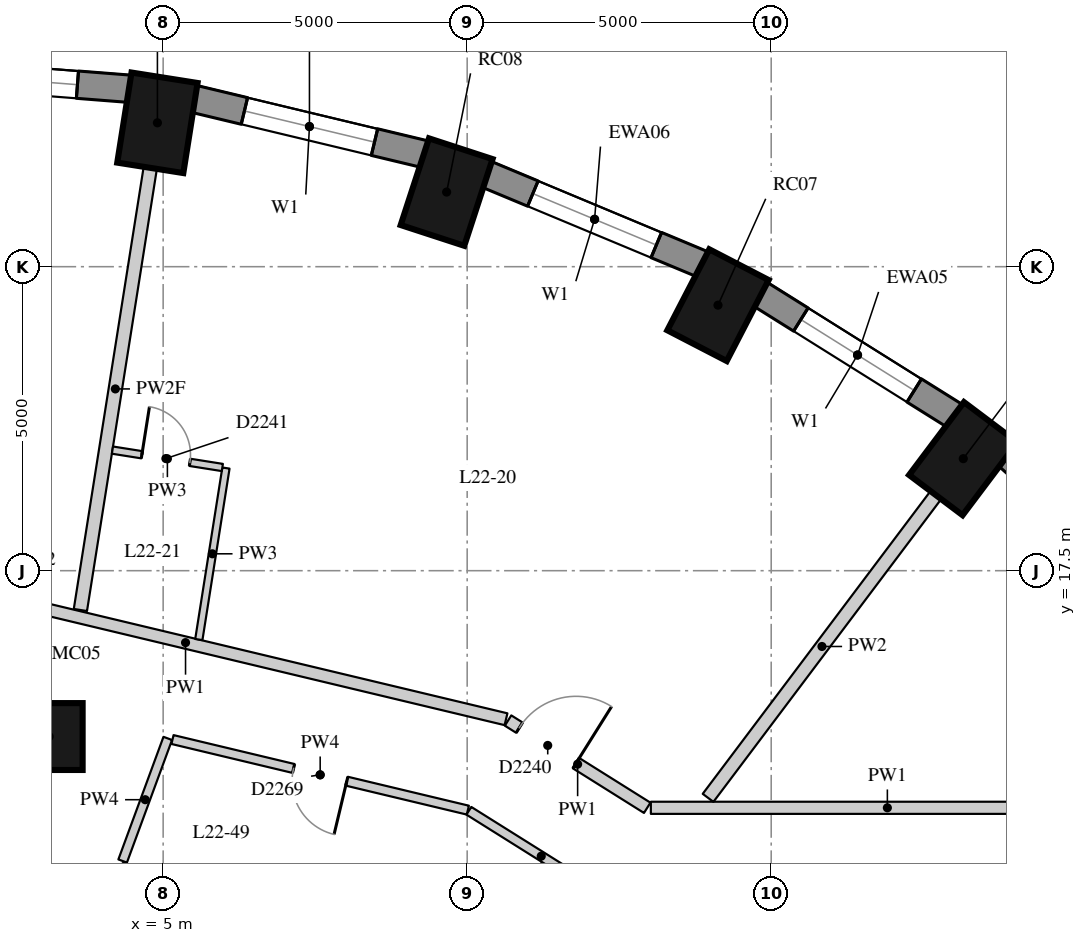
"""IFC4 building model, lengths in metres.
Left out: names, types, materials, properties, quantities, classifications, styles, units other than length and angle.
Written with IfcOpenShell. Run it as: python <this file> out.ifc"""

import sys

from ifc_helpers import new_model, si_unit, direction, frame, frame_2d, origin, origin_2d, place, context, subcontext, project, spatial, rectangle, extrude, element, fill, save


model = new_model("IFC4")
c1 = context("Model", 3, precision=1e-05, world=origin(), true_north=direction((0.0, 1.0)))
c2 = subcontext(c1, "Body", "Model", "MODEL_VIEW")
j1 = project(units=[si_unit("LENGTHUNIT", "METRE"), si_unit("PLANEANGLEUNIT", "RADIAN")], contexts=[c1])
p1 = place(None, origin())
s1 = spatial("IfcSite", under=j1, at=p1, CompositionType="ELEMENT")
p2 = place(p1, origin())
s2 = spatial("IfcBuilding", under=s1, at=p2, CompositionType="ELEMENT")
p3 = place(p2, frame((0.0, 0.0, 81.1)))
s3 = spatial("IfcBuildingStorey", under=s2, at=p3, CompositionType="ELEMENT", Elevation=81.1)
for number, where, z_axis, x_axis in (
    (1, (18.159, 19.343, 0.0), (0.0, 0.0, 1.0), (0.601, 0.799, 0.0)),
    (2, (14.125, 21.867, 0.0), (0.0, 0.0, 1.0), (0.46, 0.888, 0.0)),
    (3, (9.662, 23.727, 0.0), (0.0, 0.0, 1.0), (0.31, 0.951, 0.0)),
    (4, (4.906, 24.866, 0.0), (0.0, 0.0, 1.0), (0.156, 0.988, 0.0)),
):
    element("IfcColumn", number, at=place(p3, frame(where, z_axis=z_axis, x_axis=x_axis)), inside=s3, PredefinedType="COLUMN", context=c2, shape_type="SweptSolid", body=[
        extrude(rectangle(XDim=1.5, YDim=1.1, at=origin_2d()), origin(), (0.0, 0.0, 1.0), 3.3),
    ])
p4 = place(p3, frame((3.126, 14.772, 0.0), z_axis=(0.0, 0.0, 1.0), x_axis=(1.0, 0.0, 0.0)))
e5 = element("IfcColumn", 5, at=p4, inside=s3, PredefinedType="COLUMN", context=c2, shape_type="SweptSolid", body=[
    extrude(rectangle(XDim=1.1, YDim=1.1, at=origin_2d()), origin(), (0.0, 0.0, 1.0), 3.3),
])
p5 = place(p3, frame((21.627, 16.943, 0.0), z_axis=(0.0, 0.0, 1.0), x_axis=(-0.745526233716, 0.66647628228, 0.0)))
e6 = element("IfcWall", 6, at=p5, inside=s3, PredefinedType="SOLIDWALL", context=c2, shape_type="SweptSolid", body=[
    extrude(rectangle(XDim=3.697, YDim=0.45, at=frame_2d((1.848, 0.0))), origin(), (0.0, 0.0, 1.0), 2.85),
])
p6 = place(p3, frame((18.023, 20.044, 0.0), z_axis=(0.0, 0.0, 1.0), x_axis=(-0.847635480093, 0.530579016629, 0.0)))
e7 = element("IfcWall", 7, at=p6, inside=s3, PredefinedType="SOLIDWALL", context=c2, shape_type="SweptSolid", body=[
    extrude(rectangle(XDim=3.782, YDim=0.45, at=frame_2d((1.891, 0.0))), origin(), (0.0, 0.0, 1.0), 2.85),
])
p7 = place(p6, frame((0.791, 0.0, 0.4)))
e8 = element("IfcOpeningElement", 8, at=p7, cuts=e7, PredefinedType="OPENING", context=c2, shape_type="SweptSolid", body=[
    extrude(rectangle(XDim=2.2, YDim=1.75, at=frame_2d((1.1, 0.875))), frame((0.0, 0.235, 0.0), z_axis=(0.0, -1.0, 0.0), x_axis=(1.0, 0.0, 0.0)), (0.0, 0.0, 1.0), 0.47),
])
p8 = place(p3, frame((13.875, 22.537, 0.0), z_axis=(0.0, 0.0, 1.0), x_axis=(-0.923031964282, 0.384723267966, 0.0)))
e9 = element("IfcWall", 9, at=p8, inside=s3, PredefinedType="SOLIDWALL", context=c2, shape_type="SweptSolid", body=[
    extrude(rectangle(XDim=3.856, YDim=0.45, at=frame_2d((1.928, 0.0))), origin(), (0.0, 0.0, 1.0), 2.85),
])
p9 = place(p8, frame((0.828, 0.0, 0.4)))
e10 = element("IfcOpeningElement", 10, at=p9, cuts=e9, PredefinedType="OPENING", context=c2, shape_type="SweptSolid", body=[
    extrude(rectangle(XDim=2.2, YDim=1.75, at=frame_2d((1.1, 0.875))), frame((0.0, 0.235, 0.0), z_axis=(0.0, -1.0, 0.0), x_axis=(1.0, 0.0, 0.0)), (0.0, 0.0, 1.0), 0.47),
])
p10 = place(p3, frame((9.308, 24.35, 0.0), z_axis=(0.0, 0.0, 1.0), x_axis=(-0.972496561493, 0.232917233979, 0.0)))
e11 = element("IfcWall", 11, at=p10, inside=s3, PredefinedType="SOLIDWALL", context=c2, shape_type="SweptSolid", body=[
    extrude(rectangle(XDim=3.911, YDim=0.45, at=frame_2d((1.956, 0.0))), origin(), (0.0, 0.0, 1.0), 2.85),
])
p11 = place(p10, frame((0.855, 0.0, 0.4)))
e12 = element("IfcOpeningElement", 12, at=p11, cuts=e11, PredefinedType="OPENING", context=c2, shape_type="SweptSolid", body=[
    extrude(rectangle(XDim=2.2, YDim=1.75, at=frame_2d((1.1, 0.875))), frame((0.0, 0.235, 0.0), z_axis=(0.0, -1.0, 0.0), x_axis=(1.0, 0.0, 0.0)), (0.0, 0.0, 1.0), 0.47),
])
p12 = place(p3, frame((4.457, 25.426, 0.0), z_axis=(0.0, 0.0, 1.0), x_axis=(-0.996955972145, 0.077966592873, 0.0)))
e13 = element("IfcWall", 13, at=p12, inside=s3, PredefinedType="SOLIDWALL", context=c2, shape_type="SweptSolid", body=[
    extrude(rectangle(XDim=3.939, YDim=0.45, at=frame_2d((1.97, 0.0))), origin(), (0.0, 0.0, 1.0), 2.85),
])
p13 = place(p12, frame((0.87, 0.0, 0.4)))
e14 = element("IfcOpeningElement", 14, at=p13, cuts=e13, PredefinedType="OPENING", context=c2, shape_type="SweptSolid", body=[
    extrude(rectangle(XDim=2.2, YDim=1.75, at=frame_2d((1.1, 0.875))), frame((0.0, 0.235, 0.0), z_axis=(0.0, -1.0, 0.0), x_axis=(1.0, 0.0, 0.0)), (0.0, 0.0, 1.0), 0.47),
])
p14 = place(p3, frame((0.098, 17.577, 0.0), z_axis=(0.0, 0.0, 1.0), x_axis=(0.97259262522, -0.232515774447, 0.0)))
e15 = element("IfcWall", 15, at=p14, inside=s3, PredefinedType="PARTITIONING", context=c2, shape_type="SweptSolid", body=[
    extrude(rectangle(XDim=10.838, YDim=0.2, at=frame_2d((5.419, 0.0))), origin(), (0.0, 0.0, 1.0), 2.85),
])
p15 = place(p14, frame((1.905, 0.0, 0.0)))
e16 = element("IfcOpeningElement", 16, at=p15, cuts=e15, PredefinedType="OPENING", context=c2, shape_type="SweptSolid", body=[
    extrude(rectangle(XDim=1.0, YDim=2.1, at=frame_2d((0.5, 1.05))), frame((0.0, 0.11, 0.0), z_axis=(0.0, -1.0, 0.0), x_axis=(1.0, 0.0, 0.0)), (0.0, 0.0, 1.0), 0.22),
])
p16 = place(p3, frame((10.672, 15.035, 0.0), z_axis=(0.0, 0.0, 1.0), x_axis=(0.847149253931, -0.531355005213, 0.0)))
e17 = element("IfcWall", 17, at=p16, inside=s3, PredefinedType="PARTITIONING", context=c2, shape_type="SweptSolid", body=[
    extrude(rectangle(XDim=2.701, YDim=0.2, at=frame_2d((1.351, 0.0))), origin(), (0.0, 0.0, 1.0), 2.85),
])
p17 = place(p16, frame((0.22, 0.0, 0.0)))
e18 = element("IfcOpeningElement", 18, at=p17, cuts=e17, PredefinedType="OPENING", context=c2, shape_type="SweptSolid", body=[
    extrude(rectangle(XDim=1.1, YDim=2.1, at=frame_2d((0.55, 1.05))), frame((0.0, 0.11, 0.0), z_axis=(0.0, -1.0, 0.0), x_axis=(1.0, 0.0, 0.0)), (0.0, 0.0, 1.0), 0.22),
])
p18 = place(p3, frame((13.021, 13.6, 0.0), z_axis=(0.0, 0.0, 1.0), x_axis=(1.0, 0.0, 0.0)))
e19 = element("IfcWall", 19, at=p18, inside=s3, PredefinedType="PARTITIONING", context=c2, shape_type="SweptSolid", body=[
    extrude(rectangle(XDim=7.779, YDim=0.2, at=frame_2d((3.89, 0.0))), origin(), (0.0, 0.0, 1.0), 2.85),
])
p19 = place(p3, frame((4.865, 12.042, 0.0), z_axis=(0.0, 0.0, 1.0), x_axis=(-0.660014599896, 0.751252772323, 0.0)))
e20 = element("IfcWall", 20, at=p19, inside=s3, PredefinedType="PARTITIONING", context=c2, shape_type="SweptSolid", body=[
    extrude(rectangle(XDim=0.835, YDim=0.15, at=frame_2d((0.417, 0.0))), origin(), (0.0, 0.0, 1.0), 2.4),
])
p20 = place(p3, frame((4.334, 12.725, 0.0), z_axis=(0.0, 0.0, 1.0), x_axis=(0.345226102509, 0.938519545959, 0.0)))
e21 = element("IfcWall", 21, at=p20, inside=s3, PredefinedType="PARTITIONING", context=c2, shape_type="SweptSolid", body=[
    extrude(rectangle(XDim=2.148, YDim=0.15, at=frame_2d((1.074, 0.0))), origin(), (0.0, 0.0, 1.0), 2.85),
])
p21 = place(p3, frame((5.154, 14.723, 0.0), z_axis=(0.0, 0.0, 1.0), x_axis=(0.972595476038, -0.232503849411, 0.0)))
e22 = element("IfcWall", 22, at=p21, inside=s3, PredefinedType="PARTITIONING", context=c2, shape_type="SweptSolid", body=[
    extrude(rectangle(XDim=4.994, YDim=0.15, at=frame_2d((2.497, 0.0))), origin(), (0.0, 0.0, 1.0), 2.85),
])
p22 = place(p21, frame((2.047, 0.0, 0.0)))
e23 = element("IfcOpeningElement", 23, at=p22, cuts=e22, PredefinedType="OPENING", context=c2, shape_type="SweptSolid", body=[
    extrude(rectangle(XDim=0.9, YDim=2.1, at=frame_2d((0.45, 1.05))), frame((0.0, 0.085, 0.0), z_axis=(0.0, -1.0, 0.0), x_axis=(1.0, 0.0, 0.0)), (0.0, 0.0, 1.0), 0.17),
])
p23 = place(p3, frame((10.028, 13.551, 0.0), z_axis=(0.0, 0.0, 1.0), x_axis=(0.847128314977, -0.531388387118, 0.0)))
e24 = element("IfcWall", 24, at=p23, inside=s3, PredefinedType="PARTITIONING", context=c2, shape_type="SweptSolid", body=[
    extrude(rectangle(XDim=2.81, YDim=0.15, at=frame_2d((1.405, 0.0))), origin(), (0.0, 0.0, 1.0), 2.85),
])
p24 = place(p3, frame((17.708, 18.743, 0.0), z_axis=(0.0, 0.0, 1.0), x_axis=(-0.601177883261, -0.799115231164, 0.0)))
e25 = element("IfcWall", 25, at=p24, inside=s3, PredefinedType="PARTITIONING", context=c2, shape_type="SweptSolid", body=[
    extrude(rectangle(XDim=6.231, YDim=0.22, at=frame_2d((3.116, 0.0))), origin(), (0.0, 0.0, 1.0), 2.85),
])
p25 = place(p3, frame((4.788, 24.125, 0.0), z_axis=(0.0, 0.0, 1.0), x_axis=(-0.156122641138, -0.987737678194, 0.0)))
e26 = element("IfcWall", 26, at=p25, inside=s3, PredefinedType="PARTITIONING", context=c2, shape_type="SweptSolid", body=[
    extrude(rectangle(XDim=7.362, YDim=0.22, at=frame_2d((3.681, 0.0))), origin(), (0.0, 0.0, 1.0), 2.3),
])
p26 = place(p3, frame((5.587, 16.367, 0.0), z_axis=(0.0, 0.0, 1.0), x_axis=(0.15619964473, 0.987725503865, 0.0)))
e27 = element("IfcWall", 27, at=p26, inside=s3, PredefinedType="PARTITIONING", context=c2, shape_type="SweptSolid", body=[
    extrude(rectangle(XDim=2.856, YDim=0.12, at=frame_2d((1.428, 0.0))), origin(), (0.0, 0.0, 1.0), 2.85),
])
p27 = place(p3, frame((5.973, 19.197, 0.0), z_axis=(0.0, 0.0, 1.0), x_axis=(-0.98771965546, 0.156236622524, 0.0)))
e28 = element("IfcWall", 28, at=p27, inside=s3, PredefinedType="PARTITIONING", context=c2, shape_type="SweptSolid", body=[
    extrude(rectangle(XDim=1.83, YDim=0.12, at=frame_2d((0.915, 0.0))), origin(), (0.0, 0.0, 1.0), 2.85),
])
p28 = place(p27, frame((0.54, 0.0, 0.0)))
e29 = element("IfcOpeningElement", 29, at=p28, cuts=e28, PredefinedType="OPENING", context=c2, shape_type="SweptSolid", body=[
    extrude(rectangle(XDim=0.8, YDim=2.1, at=frame_2d((0.4, 1.05))), frame((0.0, 0.07, 0.0), z_axis=(0.0, -1.0, 0.0), x_axis=(1.0, 0.0, 0.0)), (0.0, 0.0, 1.0), 0.14),
])
p29 = place(p7, origin())
e30 = element("IfcWindow", 30, at=p29, inside=s3, PartitioningType="SINGLE_PANEL", PredefinedType="WINDOW", context=c2, shape_type="SweptSolid", body=[
    extrude(rectangle(XDim=2.2, YDim=1.75, at=frame_2d((1.1, 0.875))), frame((0.0, 0.035, 0.0), z_axis=(0.0, -1.0, 0.0), x_axis=(1.0, 0.0, 0.0)), (0.0, 0.0, 1.0), 0.06),
])
fill(e8, e30)
p30 = place(p9, origin())
e31 = element("IfcWindow", 31, at=p30, inside=s3, PartitioningType="SINGLE_PANEL", PredefinedType="WINDOW", context=c2, shape_type="SweptSolid", body=[
    extrude(rectangle(XDim=2.2, YDim=1.75, at=frame_2d((1.1, 0.875))), frame((0.0, 0.035, 0.0), z_axis=(0.0, -1.0, 0.0), x_axis=(1.0, 0.0, 0.0)), (0.0, 0.0, 1.0), 0.06),
])
fill(e10, e31)
p31 = place(p11, origin())
e32 = element("IfcWindow", 32, at=p31, inside=s3, PartitioningType="SINGLE_PANEL", PredefinedType="WINDOW", context=c2, shape_type="SweptSolid", body=[
    extrude(rectangle(XDim=2.2, YDim=1.75, at=frame_2d((1.1, 0.875))), frame((0.0, 0.035, 0.0), z_axis=(0.0, -1.0, 0.0), x_axis=(1.0, 0.0, 0.0)), (0.0, 0.0, 1.0), 0.06),
])
fill(e12, e32)
p32 = place(p13, origin())
e33 = element("IfcWindow", 33, at=p32, inside=s3, PartitioningType="SINGLE_PANEL", PredefinedType="WINDOW", context=c2, shape_type="SweptSolid", body=[
    extrude(rectangle(XDim=2.2, YDim=1.75, at=frame_2d((1.1, 0.875))), frame((0.0, 0.035, 0.0), z_axis=(0.0, -1.0, 0.0), x_axis=(1.0, 0.0, 0.0)), (0.0, 0.0, 1.0), 0.06),
])
fill(e14, e33)
p33 = place(p17, origin())
e34 = element("IfcDoor", 34, at=p33, inside=s3, OperationType="SINGLE_SWING_RIGHT", PredefinedType="DOOR", context=c2, shape_type="SweptSolid", body=[
    extrude(rectangle(XDim=1.1, YDim=2.1, at=frame_2d((0.55, 1.05))), frame((0.0, 0.025, 0.0), z_axis=(0.0, -1.0, 0.0), x_axis=(1.0, 0.0, 0.0)), (0.0, 0.0, 1.0), 0.05),
])
fill(e18, e34)
p34 = place(p28, origin())
e35 = element("IfcDoor", 35, at=p34, inside=s3, OperationType="SINGLE_SWING_LEFT", PredefinedType="DOOR", context=c2, shape_type="SweptSolid", body=[
    extrude(rectangle(XDim=0.8, YDim=2.1, at=frame_2d((0.4, 1.05))), frame((0.0, 0.025, 0.0), z_axis=(0.0, -1.0, 0.0), x_axis=(1.0, 0.0, 0.0)), (0.0, 0.0, 1.0), 0.05),
])
fill(e29, e35)
p35 = place(p22, origin())
e36 = element("IfcDoor", 36, at=p35, inside=s3, OperationType="SINGLE_SWING_LEFT", PredefinedType="DOOR", context=c2, shape_type="SweptSolid", body=[
    extrude(rectangle(XDim=0.9, YDim=2.1, at=frame_2d((0.45, 1.05))), frame((0.0, 0.025, 0.0), z_axis=(0.0, -1.0, 0.0), x_axis=(1.0, 0.0, 0.0)), (0.0, 0.0, 1.0), 0.05),
])
fill(e23, e36)
save(model, sys.argv[1])
